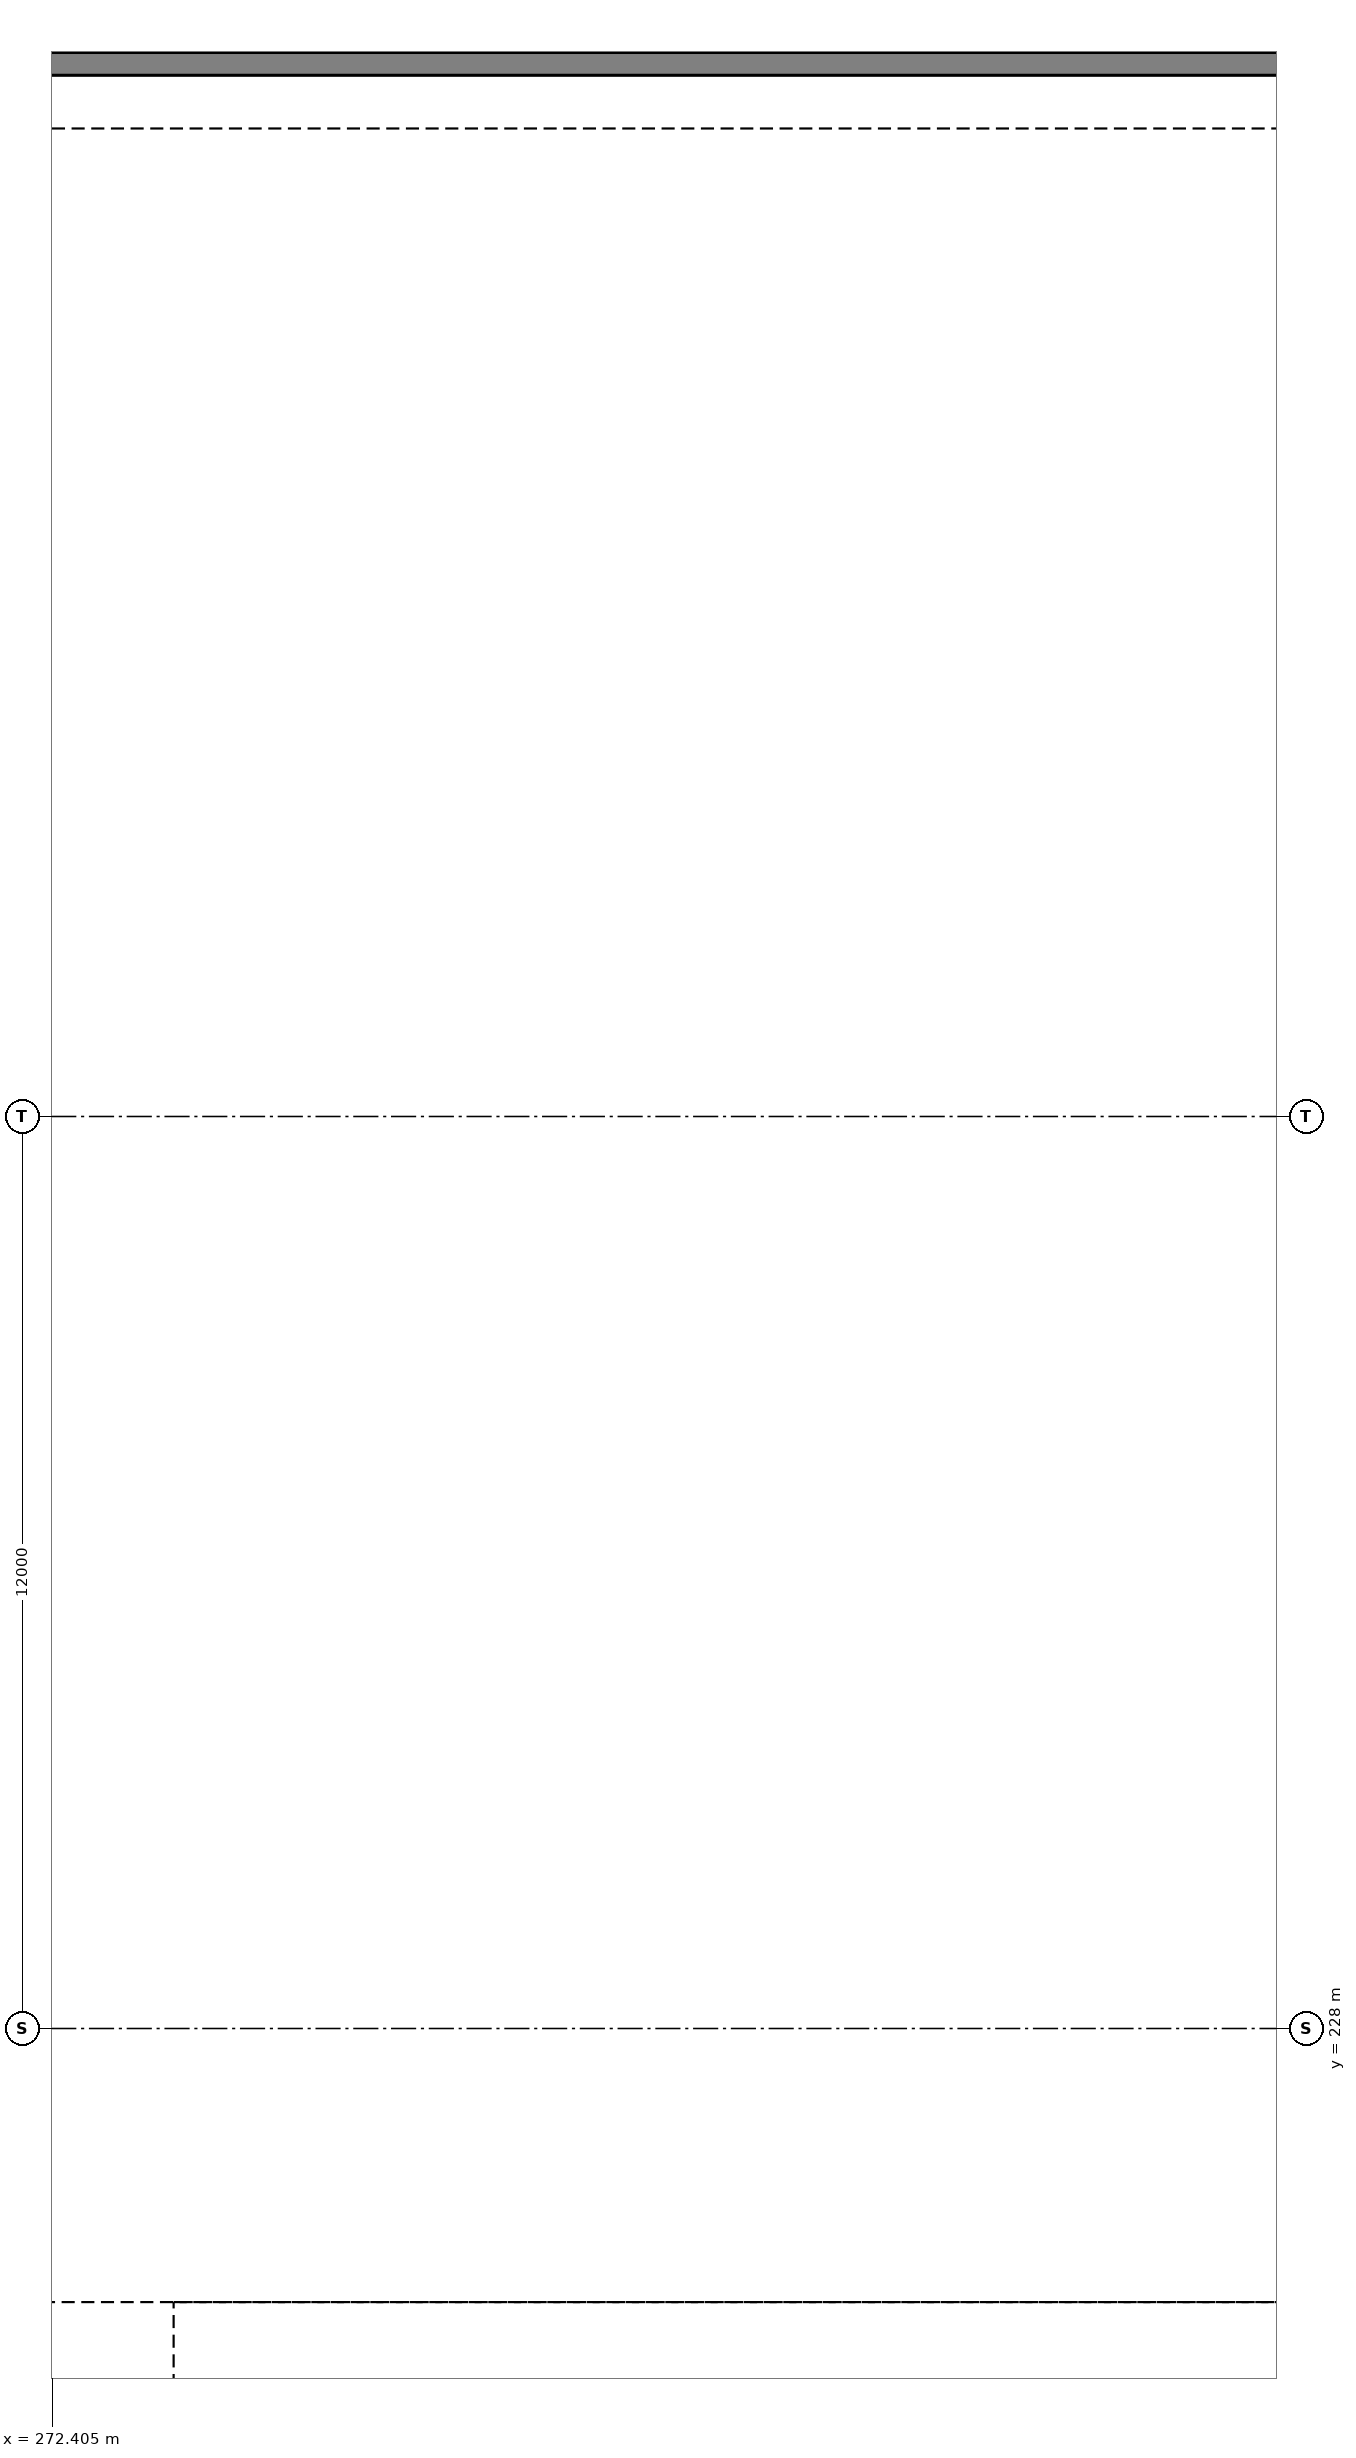
"""IFC4 building model, lengths in metres.
Left out: names, types, materials, properties, quantities, classifications, styles, units other than length and angle.
Written with IfcOpenShell. Run it as: python <this file> out.ifc"""

import sys

from ifc_helpers import new_model, si_unit, direction, frame, frame_2d, origin, place, context, subcontext, project, spatial, rectangle, extrude, element, fill, save


model = new_model("IFC4")
c1 = context("Model", 3, precision=1e-05, world=origin(), true_north=direction((0.0, 1.0)))
c2 = subcontext(c1, "Body", "Model", "MODEL_VIEW")
j1 = project(units=[si_unit("LENGTHUNIT", "METRE"), si_unit("PLANEANGLEUNIT", "RADIAN")], contexts=[c1])
p1 = place(None, origin())
s1 = spatial("IfcSite", under=j1, at=p1, CompositionType="ELEMENT")
p2 = place(p1, origin())
s2 = spatial("IfcBuilding", under=s1, at=p2, CompositionType="ELEMENT")
p3 = place(p2, origin())
s3 = spatial("IfcBuildingStorey", under=s2, at=p3, CompositionType="ELEMENT", Elevation=0.0)
p4 = place(p3, frame((278.205, 191.578, -0.3), z_axis=(0.0, 0.0, 1.0), x_axis=(-0.587787147296, 0.809015617571, 0.0)))
e1 = element("IfcWall", 1, at=p4, inside=s3, PredefinedType="SOLIDWALL", context=c2, shape_type="SweptSolid", body=[
    extrude(rectangle(XDim=53.5, YDim=0.4, at=frame_2d((26.75, 0.0))), origin(), (0.0, 0.0, 1.0), 7.5),
])
p5 = place(p4, frame((24.35, 0.0, 1.4)))
e2 = element("IfcOpeningElement", 2, at=p5, cuts=e1, PredefinedType="OPENING", context=c2, shape_type="SweptSolid", body=[
    extrude(rectangle(XDim=4.8, YDim=4.5, at=frame_2d((2.4, 2.25))), frame((0.0, 0.21, 0.0), z_axis=(0.0, -1.0, 0.0), x_axis=(1.0, 0.0, 0.0)), (0.0, 0.0, 1.0), 0.42),
])
p6 = place(p3, frame((280.494, 213.946, -0.3), z_axis=(0.0, 0.0, 1.0), x_axis=(-0.66924426707, 0.743042469173, 0.0)))
e3 = element("IfcWall", 3, at=p6, inside=s3, PredefinedType="SOLIDWALL", context=c2, shape_type="SweptSolid", body=[
    extrude(rectangle(XDim=19.105, YDim=0.4, at=frame_2d((9.552, 0.0))), origin(), (0.0, 0.0, 1.0), 7.5),
])
p7 = place(p6, frame((1.4, 0.0, 2.5)))
e4 = element("IfcOpeningElement", 4, at=p7, cuts=e3, PredefinedType="OPENING", context=c2, shape_type="SweptSolid", body=[
    extrude(rectangle(XDim=1.2, YDim=3.5, at=frame_2d((0.6, 1.75))), frame((0.0, 0.21, 0.0), z_axis=(0.0, -1.0, 0.0), x_axis=(1.0, 0.0, 0.0)), (0.0, 0.0, 1.0), 0.42),
])
p8 = place(p6, frame((6.2, 0.0, 2.5)))
e5 = element("IfcOpeningElement", 5, at=p8, cuts=e3, PredefinedType="OPENING", context=c2, shape_type="SweptSolid", body=[
    extrude(rectangle(XDim=1.2, YDim=3.5, at=frame_2d((0.6, 1.75))), frame((0.0, 0.21, 0.0), z_axis=(0.0, -1.0, 0.0), x_axis=(1.0, 0.0, 0.0)), (0.0, 0.0, 1.0), 0.42),
])
p9 = place(p6, frame((11.7, 0.0, 2.5)))
e6 = element("IfcOpeningElement", 6, at=p9, cuts=e3, PredefinedType="OPENING", context=c2, shape_type="SweptSolid", body=[
    extrude(rectangle(XDim=1.2, YDim=3.5, at=frame_2d((0.6, 1.75))), frame((0.0, 0.21, 0.0), z_axis=(0.0, -1.0, 0.0), x_axis=(1.0, 0.0, 0.0)), (0.0, 0.0, 1.0), 0.42),
])
p10 = place(p6, frame((16.5, 0.0, 2.5)))
e7 = element("IfcOpeningElement", 7, at=p10, cuts=e3, PredefinedType="OPENING", context=c2, shape_type="SweptSolid", body=[
    extrude(rectangle(XDim=1.2, YDim=3.5, at=frame_2d((0.6, 1.75))), frame((0.0, 0.21, 0.0), z_axis=(0.0, -1.0, 0.0), x_axis=(1.0, 0.0, 0.0)), (0.0, 0.0, 1.0), 0.42),
])
p11 = place(p9, origin())
e8 = element("IfcWindow", 8, at=p11, inside=s3, PartitioningType="SINGLE_PANEL", PredefinedType="WINDOW", context=c2, shape_type="SweptSolid", body=[
    extrude(rectangle(XDim=1.2, YDim=3.5, at=frame_2d((0.6, 1.75))), frame((0.0, 0.03, 0.0), z_axis=(0.0, -1.0, 0.0), x_axis=(1.0, 0.0, 0.0)), (0.0, 0.0, 1.0), 0.06),
])
fill(e6, e8)
save(model, sys.argv[1])
